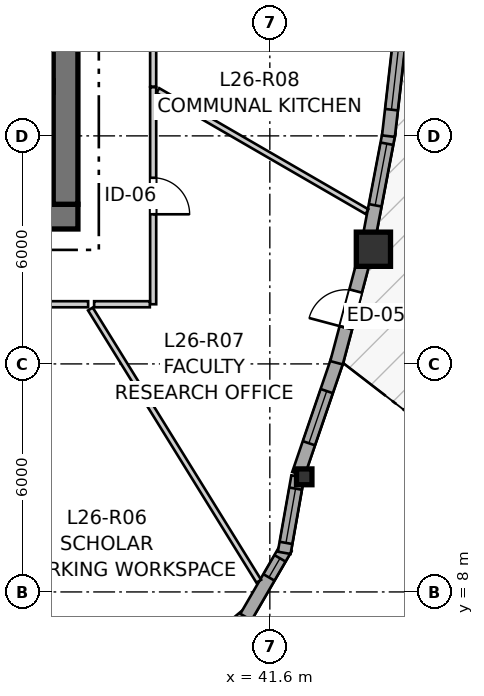
"""IFC4 building model, lengths in metres.
Left out: names, types, materials, properties, quantities, classifications, styles, units other than length and angle.
Written with IfcOpenShell. Run it as: python <this file> out.ifc"""

import sys

from ifc_helpers import new_model, si_unit, direction, frame, frame_2d, origin, origin_2d, place, context, subcontext, project, spatial, rectangle, i_section, extrude, source, transform, mapped, element, fill, save


model = new_model("IFC4")
c1 = context("Model", 3, precision=1e-05, world=origin(), true_north=direction((0.0, 1.0)))
c2 = subcontext(c1, "Body", "Model", "MODEL_VIEW")
j1 = project(units=[si_unit("LENGTHUNIT", "METRE"), si_unit("PLANEANGLEUNIT", "RADIAN")], contexts=[c1])
p1 = place(None, origin())
s1 = spatial("IfcSite", under=j1, at=p1, CompositionType="ELEMENT")
p2 = place(p1, origin())
s2 = spatial("IfcBuilding", under=s1, at=p2, CompositionType="ELEMENT")
p3 = place(p2, frame((0.0, 0.0, 89.6)))
s3 = spatial("IfcBuildingStorey", under=s2, at=p3, CompositionType="ELEMENT", Elevation=89.6)
p4 = place(p3, frame((24.15, 17.875, 0.0), z_axis=(0.0, 0.0, 1.0), x_axis=(1.0, 0.0, 0.0)))
e1 = element("IfcWall", 1, at=p4, inside=s3, PredefinedType="SHEAR", context=c2, shape_type="SweptSolid", body=[
    extrude(rectangle(XDim=12.4, YDim=0.65, at=frame_2d((6.2, 0.0))), origin(), (0.0, 0.0, 1.0), 2.95),
])
p5 = place(p3, frame((36.225, 18.2, 0.0), z_axis=(0.0, 0.0, 1.0), x_axis=(0.0, 1.0, 0.0)))
e2 = element("IfcWall", 2, at=p5, inside=s3, PredefinedType="SHEAR", context=c2, shape_type="SweptSolid", body=[
    extrude(rectangle(XDim=15.6, YDim=0.65, at=frame_2d((7.8, 0.0))), origin(), (0.0, 0.0, 1.0), 2.95),
])
p6 = place(p5, frame((4.25, 0.0, 0.0)))
e3 = element("IfcOpeningElement", 3, at=p6, cuts=e2, PredefinedType="OPENING", context=c2, shape_type="SweptSolid", body=[
    extrude(rectangle(XDim=1.1, YDim=2.15, at=frame_2d((0.55, 1.075))), frame((0.0, 0.335, 0.0), z_axis=(0.0, -1.0, 0.0), x_axis=(1.0, 0.0, 0.0)), (0.0, 0.0, 1.0), 0.67),
])
p7 = place(p5, frame((10.25, 0.0, 0.0)))
e4 = element("IfcOpeningElement", 4, at=p7, cuts=e2, PredefinedType="OPENING", context=c2, shape_type="SweptSolid", body=[
    extrude(rectangle(XDim=1.1, YDim=2.15, at=frame_2d((0.55, 1.075))), frame((0.0, 0.335, 0.0), z_axis=(0.0, -1.0, 0.0), x_axis=(1.0, 0.0, 0.0)), (0.0, 0.0, 1.0), 0.67),
])
p8 = place(p3, frame((24.8, 21.3, 0.0), z_axis=(0.0, 0.0, 1.0), x_axis=(1.0, 0.0, 0.0)))
e5 = element("IfcWall", 5, at=p8, inside=s3, PredefinedType="SHEAR", context=c2, shape_type="SweptSolid", body=[
    extrude(rectangle(XDim=11.1, YDim=0.3, at=frame_2d((5.55, 0.0))), origin(), (0.0, 0.0, 1.0), 2.95),
])
p9 = place(p8, frame((6.22, 0.0, 0.0)))
e6 = element("IfcOpeningElement", 6, at=p9, cuts=e5, PredefinedType="OPENING", context=c2, shape_type="SweptSolid", body=[
    extrude(rectangle(XDim=0.98, YDim=2.15, at=frame_2d((0.49, 1.075))), frame((0.0, 0.16, 0.0), z_axis=(0.0, -1.0, 0.0), x_axis=(1.0, 0.0, 0.0)), (0.0, 0.0, 1.0), 0.32),
])
p10 = place(p8, frame((9.15, 0.0, 0.0)))
e7 = element("IfcOpeningElement", 7, at=p10, cuts=e5, PredefinedType="OPENING", context=c2, shape_type="SweptSolid", body=[
    extrude(rectangle(XDim=1.15, YDim=2.15, at=frame_2d((0.575, 1.075))), frame((0.0, 0.16, 0.0), z_axis=(0.0, -1.0, 0.0), x_axis=(1.0, 0.0, 0.0)), (0.0, 0.0, 1.0), 0.32),
])
m1 = source(origin(), c2, "Body", "SweptSolid", [
    extrude(i_section(OverallWidth=0.406, OverallDepth=0.416, WebThickness=0.027, FlangeThickness=0.044, FilletRadius=0.015, at=origin_2d()), origin(), (0.0, 0.0, 1.0), 2.95),
])
p11 = place(p3, frame((42.505, 11.029, 0.0), z_axis=(0.0, 0.0, 1.0), x_axis=(1.0, 0.0, 0.0)))
e8 = element("IfcColumn", 8, at=p11, inside=s3, PredefinedType="PILASTER", context=c2, shape_type="MappedRepresentation", body=[
    mapped(m1, transform((0.0, 0.0, 0.0), x_axis=(1.0, 0.0, 0.0), y_axis=(0.0, 1.0, 0.0), z_axis=(0.0, 0.0, 1.0), scale=1.0)),
])
m2 = source(origin(), c2, "Body", "SweptSolid", [
    extrude(rectangle(XDim=0.9, YDim=0.9, at=origin_2d()), origin(), (0.0, 0.0, 1.0), 2.95),
])
p12 = place(p3, frame((44.325, 17.017, 0.0), z_axis=(0.0, 0.0, 1.0), x_axis=(1.0, 0.0, 0.0)))
e9 = element("IfcColumn", 9, at=p12, inside=s3, PredefinedType="COLUMN", context=c2, shape_type="MappedRepresentation", body=[
    mapped(m2, transform((0.0, 0.0, 0.0), x_axis=(1.0, 0.0, 0.0), y_axis=(0.0, 1.0, 0.0), z_axis=(0.0, 0.0, 1.0), scale=1.0)),
])
p13 = place(p3, frame((39.444, 6.099, 0.0), z_axis=(0.0, 0.0, 1.0), x_axis=(0.768497696041, 0.639852554249, 0.0)))
e10 = element("IfcWall", 10, at=p13, inside=s3, PredefinedType="SOLIDWALL", context=c2, shape_type="SweptSolid", body=[
    extrude(rectangle(XDim=2.099, YDim=0.34, at=frame_2d((1.049, 0.0))), origin(), (0.0, 0.0, 1.0), 2.48),
])
p14 = place(p13, frame((0.574, 0.0, 0.82)))
e11 = element("IfcOpeningElement", 11, at=p14, cuts=e10, PredefinedType="OPENING", context=c2, shape_type="SweptSolid", body=[
    extrude(rectangle(XDim=0.95, YDim=1.35, at=frame_2d((0.475, 0.675))), frame((0.0, 0.18, 0.0), z_axis=(0.0, -1.0, 0.0), x_axis=(1.0, 0.0, 0.0)), (0.0, 0.0, 1.0), 0.36),
])
p15 = place(p3, frame((40.971, 7.34, 0.0), z_axis=(0.0, 0.0, 1.0), x_axis=(0.501902596059, 0.864924149315, 0.0)))
e12 = element("IfcWall", 12, at=p15, inside=s3, PredefinedType="SOLIDWALL", context=c2, shape_type="SweptSolid", body=[
    extrude(rectangle(XDim=2.099, YDim=0.34, at=frame_2d((1.049, 0.0))), origin(), (0.0, 0.0, 1.0), 2.48),
])
p16 = place(p15, frame((1.206, 0.0, 0.82)))
e13 = element("IfcOpeningElement", 13, at=p16, cuts=e12, PredefinedType="OPENING", context=c2, shape_type="SweptSolid", body=[
    extrude(rectangle(XDim=0.58, YDim=1.35, at=frame_2d((0.29, 0.675))), frame((0.0, 0.18, 0.0), z_axis=(0.0, -1.0, 0.0), x_axis=(1.0, 0.0, 0.0)), (0.0, 0.0, 1.0), 0.36),
])
p17 = place(p3, frame((41.978, 9.029, 0.0), z_axis=(0.0, 0.0, 1.0), x_axis=(0.174283452483, 0.984695525627, 0.0)))
e14 = element("IfcWall", 14, at=p17, inside=s3, PredefinedType="SOLIDWALL", context=c2, shape_type="SweptSolid", body=[
    extrude(rectangle(XDim=2.041, YDim=0.34, at=frame_2d((1.021, 0.0))), origin(), (0.0, 0.0, 1.0), 2.48),
])
p18 = place(p17, frame((0.265, 0.0, 0.82)))
e15 = element("IfcOpeningElement", 15, at=p18, cuts=e14, PredefinedType="OPENING", context=c2, shape_type="SweptSolid", body=[
    extrude(rectangle(XDim=1.45, YDim=1.25, at=frame_2d((0.725, 0.625))), frame((0.0, 0.18, 0.0), z_axis=(0.0, -1.0, 0.0), x_axis=(1.0, 0.0, 0.0)), (0.0, 0.0, 1.0), 0.36),
])
p19 = place(p3, frame((42.351, 11.103, 0.0), z_axis=(0.0, 0.0, 1.0), x_axis=(0.323582854182, 0.946199839611, 0.0)))
e16 = element("IfcWall", 16, at=p19, inside=s3, PredefinedType="SOLIDWALL", context=c2, shape_type="SweptSolid", body=[
    extrude(rectangle(XDim=3.182, YDim=0.34, at=frame_2d((1.591, 0.0))), origin(), (0.0, 0.0, 1.0), 2.48),
])
p20 = place(p19, frame((0.856, 0.0, 0.82)))
e17 = element("IfcOpeningElement", 17, at=p20, cuts=e16, PredefinedType="OPENING", context=c2, shape_type="SweptSolid", body=[
    extrude(rectangle(XDim=1.45, YDim=1.25, at=frame_2d((0.725, 0.625))), frame((0.0, 0.18, 0.0), z_axis=(0.0, -1.0, 0.0), x_axis=(1.0, 0.0, 0.0)), (0.0, 0.0, 1.0), 0.36),
])
p21 = place(p3, frame((43.355, 14.03, 0.0), z_axis=(0.0, 0.0, 1.0), x_axis=(0.257056088809, 0.96639648551, 0.0)))
e18 = element("IfcWall", 18, at=p21, inside=s3, PredefinedType="SOLIDWALL", context=c2, shape_type="SweptSolid", body=[
    extrude(rectangle(XDim=2.906, YDim=0.34, at=frame_2d((1.453, 0.0))), origin(), (0.0, 0.0, 1.0), 2.48),
])
p22 = place(p21, frame((0.953, 0.0, 0.0)))
e19 = element("IfcOpeningElement", 19, at=p22, cuts=e18, PredefinedType="OPENING", context=c2, shape_type="SweptSolid", body=[
    extrude(rectangle(XDim=1.0, YDim=2.1, at=frame_2d((0.5, 1.05))), frame((0.0, 0.18, 0.0), z_axis=(0.0, -1.0, 0.0), x_axis=(1.0, 0.0, 0.0)), (0.0, 0.0, 1.0), 0.36),
])
p23 = place(p3, frame((44.201, 17.275, 0.0), z_axis=(0.0, 0.0, 1.0), x_axis=(0.186703550023, 0.982416298933, 0.0)))
e20 = element("IfcWall", 20, at=p23, inside=s3, PredefinedType="SOLIDWALL", context=c2, shape_type="SweptSolid", body=[
    extrude(rectangle(XDim=2.856, YDim=0.34, at=frame_2d((1.428, 0.0))), origin(), (0.0, 0.0, 1.0), 2.48),
])
p24 = place(p23, frame((0.914, 0.0, 0.82)))
e21 = element("IfcOpeningElement", 21, at=p24, cuts=e20, PredefinedType="OPENING", context=c2, shape_type="SweptSolid", body=[
    extrude(rectangle(XDim=1.65, YDim=1.45, at=frame_2d((0.825, 0.725))), frame((0.0, 0.18, 0.0), z_axis=(0.0, -1.0, 0.0), x_axis=(1.0, 0.0, 0.0)), (0.0, 0.0, 1.0), 0.36),
])
p25 = place(p3, frame((44.721, 19.993, 0.0), z_axis=(0.0, 0.0, 1.0), x_axis=(0.113224078967, 0.993569478165, 0.0)))
e22 = element("IfcWall", 22, at=p25, inside=s3, PredefinedType="SOLIDWALL", context=c2, shape_type="SweptSolid", body=[
    extrude(rectangle(XDim=3.032, YDim=0.34, at=frame_2d((1.516, 0.0))), origin(), (0.0, 0.0, 1.0), 2.48),
])
p26 = place(p25, frame((0.701, 0.0, 0.82)))
e23 = element("IfcOpeningElement", 23, at=p26, cuts=e22, PredefinedType="OPENING", context=c2, shape_type="SweptSolid", body=[
    extrude(rectangle(XDim=1.65, YDim=1.45, at=frame_2d((0.825, 0.725))), frame((0.0, 0.18, 0.0), z_axis=(0.0, -1.0, 0.0), x_axis=(1.0, 0.0, 0.0)), (0.0, 0.0, 1.0), 0.36),
])
p27 = place(p3, frame((38.53, 21.281, 0.0), z_axis=(0.0, 0.0, 1.0), x_axis=(0.0, -1.0, 0.0)))
e24 = element("IfcWall", 24, at=p27, inside=s3, PredefinedType="PARTITIONING", context=c2, shape_type="SweptSolid", body=[
    extrude(rectangle(XDim=5.711, YDim=0.16, at=frame_2d((2.855, 0.0))), origin(), (0.0, 0.0, 1.0), 2.95),
])
p28 = place(p27, frame((2.384, 0.0, 0.0)))
e25 = element("IfcOpeningElement", 25, at=p28, cuts=e24, PredefinedType="OPENING", context=c2, shape_type="SweptSolid", body=[
    extrude(rectangle(XDim=0.96, YDim=2.1, at=frame_2d((0.48, 1.05))), frame((0.0, 0.09, 0.0), z_axis=(0.0, -1.0, 0.0), x_axis=(1.0, 0.0, 0.0)), (0.0, 0.0, 1.0), 0.18),
])
p29 = place(p3, frame((36.819, 15.57, 0.0), z_axis=(0.0, 0.0, 1.0), x_axis=(-1.0, 0.0, 0.0)))
e26 = element("IfcWall", 26, at=p29, inside=s3, PredefinedType="PARTITIONING", context=c2, shape_type="SweptSolid", body=[
    extrude(rectangle(XDim=3.956, YDim=0.16, at=frame_2d((1.978, 0.0))), origin(), (0.0, 0.0, 1.0), 2.95),
])
p30 = place(p29, frame((1.522, 0.0, 0.0)))
e27 = element("IfcOpeningElement", 27, at=p30, cuts=e26, PredefinedType="OPENING", context=c2, shape_type="SweptSolid", body=[
    extrude(rectangle(XDim=0.96, YDim=2.1, at=frame_2d((0.48, 1.05))), frame((0.0, 0.09, 0.0), z_axis=(0.0, -1.0, 0.0), x_axis=(1.0, 0.0, 0.0)), (0.0, 0.0, 1.0), 0.18),
])
p31 = place(p3, frame((38.53, 24.738, 0.0), z_axis=(0.0, 0.0, 1.0), x_axis=(0.0, -1.0, 0.0)))
e28 = element("IfcWall", 28, at=p31, inside=s3, PredefinedType="PARTITIONING", context=c2, shape_type="SweptSolid", body=[
    extrude(rectangle(XDim=3.442, YDim=0.16, at=frame_2d((1.721, 0.0))), origin(), (0.0, 0.0, 1.0), 2.95),
])
p32 = place(p31, frame((1.072, 0.0, 0.0)))
e29 = element("IfcOpeningElement", 29, at=p32, cuts=e28, PredefinedType="OPENING", context=c2, shape_type="SweptSolid", body=[
    extrude(rectangle(XDim=1.3, YDim=2.1, at=frame_2d((0.65, 1.05))), frame((0.0, 0.09, 0.0), z_axis=(0.0, -1.0, 0.0), x_axis=(1.0, 0.0, 0.0)), (0.0, 0.0, 1.0), 0.18),
])
p33 = place(p3, frame((36.878, 15.445, 0.0), z_axis=(0.0, 0.0, 1.0), x_axis=(0.526001305793, -0.850483760165, 0.0)))
e30 = element("IfcWall", 30, at=p33, inside=s3, PredefinedType="PARTITIONING", context=c2, shape_type="SweptSolid", body=[
    extrude(rectangle(XDim=8.422, YDim=0.145, at=frame_2d((4.211, 0.0))), origin(), (0.0, 0.0, 1.0), 2.95),
])
p34 = place(p3, frame((38.653, 21.193, 0.0), z_axis=(0.0, 0.0, 1.0), x_axis=(0.865364941279, -0.501142213753, 0.0)))
e31 = element("IfcWall", 31, at=p34, inside=s3, PredefinedType="PARTITIONING", context=c2, shape_type="SweptSolid", body=[
    extrude(rectangle(XDim=6.359, YDim=0.145, at=frame_2d((3.179, 0.0))), origin(), (0.0, 0.0, 1.0), 2.95),
])
p35 = place(p3, frame((36.977, 15.57, 0.0), z_axis=(0.0, 0.0, 1.0), x_axis=(1.0, 0.0, 0.0)))
e32 = element("IfcWall", 32, at=p35, inside=s3, PredefinedType="PARTITIONING", context=c2, shape_type="SweptSolid", body=[
    extrude(rectangle(XDim=1.465, YDim=0.16, at=frame_2d((0.732, 0.0))), origin(), (0.0, 0.0, 1.0), 2.95),
])
m3 = source(origin(), c2, "Body", "SweptSolid", [
    extrude(rectangle(XDim=0.58, YDim=1.35, at=frame_2d((0.29, 0.675))), frame((0.0, 0.03, 0.0), z_axis=(0.0, -1.0, 0.0), x_axis=(1.0, 0.0, 0.0)), (0.0, 0.0, 1.0), 0.06),
])
p36 = place(p16, origin())
e33 = element("IfcWindow", 33, at=p36, inside=s3, PartitioningType="SINGLE_PANEL", PredefinedType="WINDOW", context=c2, shape_type="MappedRepresentation", body=[
    mapped(m3, transform((0.0, 0.0, 0.0), x_axis=(1.0, 0.0, 0.0), y_axis=(0.0, 1.0, 0.0), z_axis=(0.0, 0.0, 1.0), scale=1.0)),
])
fill(e13, e33)
m4 = source(origin(), c2, "Body", "SweptSolid", [
    extrude(rectangle(XDim=1.45, YDim=1.25, at=frame_2d((0.725, 0.625))), frame((0.0, 0.03, 0.0), z_axis=(0.0, -1.0, 0.0), x_axis=(1.0, 0.0, 0.0)), (0.0, 0.0, 1.0), 0.06),
])
p37 = place(p18, origin())
e34 = element("IfcWindow", 34, at=p37, inside=s3, PartitioningType="SINGLE_PANEL", PredefinedType="WINDOW", context=c2, shape_type="MappedRepresentation", body=[
    mapped(m4, transform((0.0, 0.0, 0.0), x_axis=(1.0, 0.0, 0.0), y_axis=(0.0, 1.0, 0.0), z_axis=(0.0, 0.0, 1.0), scale=1.0)),
])
fill(e15, e34)
p38 = place(p20, origin())
e35 = element("IfcWindow", 35, at=p38, inside=s3, PartitioningType="SINGLE_PANEL", PredefinedType="WINDOW", context=c2, shape_type="MappedRepresentation", body=[
    mapped(m4, transform((0.0, 0.0, 0.0), x_axis=(1.0, 0.0, 0.0), y_axis=(0.0, 1.0, 0.0), z_axis=(0.0, 0.0, 1.0), scale=1.0)),
])
fill(e17, e35)
m5 = source(origin(), c2, "Body", "SweptSolid", [
    extrude(rectangle(XDim=1.65, YDim=1.45, at=frame_2d((0.825, 0.725))), frame((0.0, 0.03, 0.0), z_axis=(0.0, -1.0, 0.0), x_axis=(1.0, 0.0, 0.0)), (0.0, 0.0, 1.0), 0.06),
])
p39 = place(p24, origin())
e36 = element("IfcWindow", 36, at=p39, inside=s3, PartitioningType="SINGLE_PANEL", PredefinedType="WINDOW", context=c2, shape_type="MappedRepresentation", body=[
    mapped(m5, transform((0.0, 0.0, 0.0), x_axis=(1.0, 0.0, 0.0), y_axis=(0.0, 1.0, 0.0), z_axis=(0.0, 0.0, 1.0), scale=1.0)),
])
fill(e21, e36)
p40 = place(p26, origin())
e37 = element("IfcWindow", 37, at=p40, inside=s3, PartitioningType="SINGLE_PANEL", PredefinedType="WINDOW", context=c2, shape_type="MappedRepresentation", body=[
    mapped(m5, transform((0.0, 0.0, 0.0), x_axis=(1.0, 0.0, 0.0), y_axis=(0.0, 1.0, 0.0), z_axis=(0.0, 0.0, 1.0), scale=1.0)),
])
fill(e23, e37)
m6 = source(origin(), c2, "Body", "SweptSolid", [
    extrude(rectangle(XDim=1.0, YDim=2.1, at=frame_2d((0.5, 1.05))), frame((0.0, 0.025, 0.0), z_axis=(0.0, -1.0, 0.0), x_axis=(1.0, 0.0, 0.0)), (0.0, 0.0, 1.0), 0.05),
])
p41 = place(p22, origin())
e38 = element("IfcDoor", 38, at=p41, inside=s3, OperationType="SINGLE_SWING_LEFT", PredefinedType="DOOR", context=c2, shape_type="MappedRepresentation", body=[
    mapped(m6, transform((0.0, 0.0, 0.0), x_axis=(1.0, 0.0, 0.0), y_axis=(0.0, 1.0, 0.0), z_axis=(0.0, 0.0, 1.0), scale=1.0)),
])
fill(e19, e38)
m7 = source(origin(), c2, "Body", "SweptSolid", [
    extrude(rectangle(XDim=0.96, YDim=2.1, at=frame_2d((0.48, 1.05))), frame((0.0, 0.025, 0.0), z_axis=(0.0, -1.0, 0.0), x_axis=(1.0, 0.0, 0.0)), (0.0, 0.0, 1.0), 0.05),
])
p42 = place(p28, origin())
e39 = element("IfcDoor", 39, at=p42, inside=s3, OperationType="SINGLE_SWING_RIGHT", PredefinedType="DOOR", context=c2, shape_type="MappedRepresentation", body=[
    mapped(m7, transform((0.0, 0.0, 0.0), x_axis=(1.0, 0.0, 0.0), y_axis=(0.0, 1.0, 0.0), z_axis=(0.0, 0.0, 1.0), scale=1.0)),
])
fill(e25, e39)
save(model, sys.argv[1])
